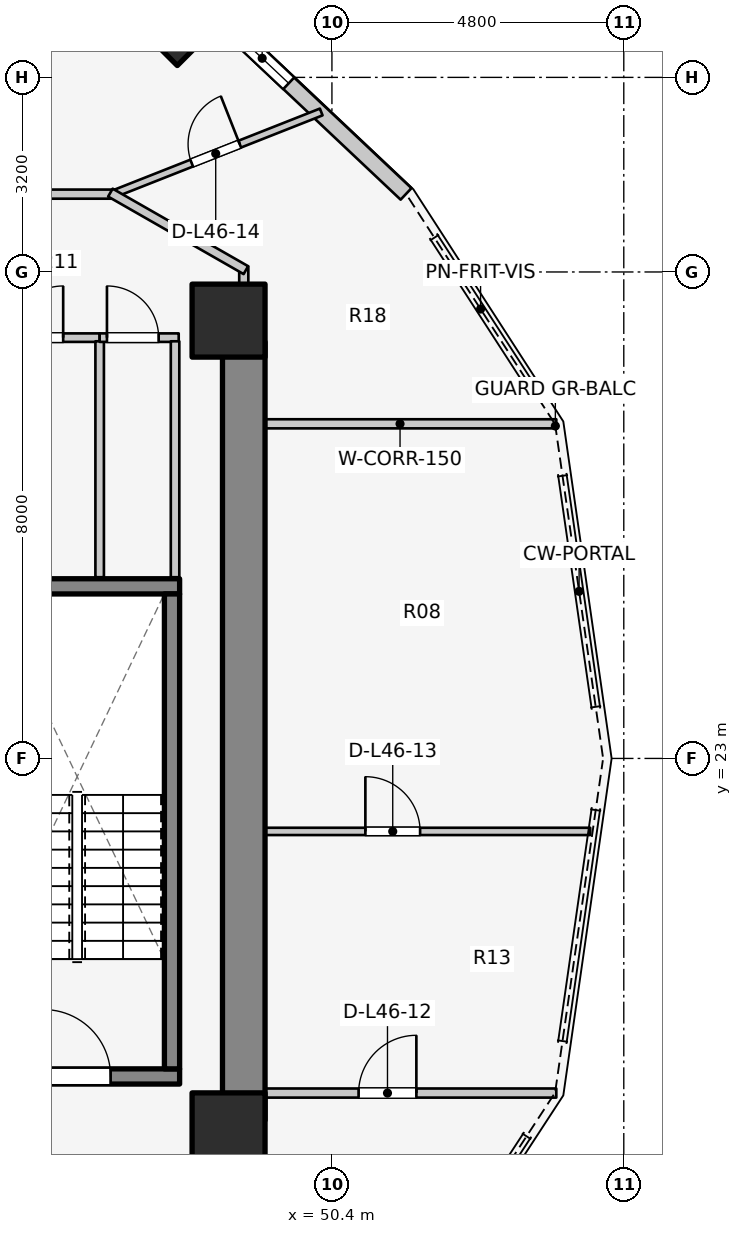
"""IFC4 building model, lengths in metres.
Left out: names, types, materials, properties, quantities, classifications, styles, units other than length and angle.
Written with IfcOpenShell. Run it as: python <this file> out.ifc"""

import sys

from ifc_helpers import new_model, si_unit, direction, frame, frame_2d, origin, origin_2d, place, context, subcontext, project, spatial, rectangle, extrude, element, fill, save


model = new_model("IFC4")
c1 = context("Model", 3, precision=1e-05, world=origin(), true_north=direction((0.0, 1.0)))
c2 = subcontext(c1, "Body", "Model", "MODEL_VIEW")
j1 = project(units=[si_unit("LENGTHUNIT", "METRE"), si_unit("PLANEANGLEUNIT", "RADIAN")], contexts=[c1])
p1 = place(None, origin())
s1 = spatial("IfcSite", under=j1, at=p1, CompositionType="ELEMENT")
p2 = place(p1, origin())
s2 = spatial("IfcBuilding", under=s1, at=p2, CompositionType="ELEMENT")
p3 = place(p2, frame((0.0, 0.0, 152.9)))
s3 = spatial("IfcBuildingStorey", under=s2, at=p3, CompositionType="ELEMENT", Elevation=152.9)
p4 = place(p3, frame((48.95, 17.05, 0.0), z_axis=(0.0, 0.0, 1.0), x_axis=(0.0, 1.0, 0.0)))
e1 = element("IfcWall", 1, at=p4, inside=s3, PredefinedType="SHEAR", context=c2, shape_type="SweptSolid", body=[
    extrude(rectangle(XDim=12.8, YDim=0.7, at=frame_2d((6.4, 0.0))), origin(), (0.0, 0.0, 1.0), 3.1),
])
p5 = place(p3, frame((44.525, 17.77, 0.0), z_axis=(0.0, 0.0, 1.0), x_axis=(1.0, 0.0, 0.0)))
e2 = element("IfcWall", 2, at=p5, inside=s3, PredefinedType="SOLIDWALL", context=c2, shape_type="SweptSolid", body=[
    extrude(rectangle(XDim=3.37, YDim=0.25, at=frame_2d((1.685, 0.0))), origin(), (0.0, 0.0, 1.0), 3.1),
])
p6 = place(p5, frame((1.135, 0.0, 0.0)))
e3 = element("IfcOpeningElement", 3, at=p6, cuts=e2, PredefinedType="OPENING", context=c2, shape_type="SweptSolid", body=[
    extrude(rectangle(XDim=1.1, YDim=2.1, at=frame_2d((0.55, 1.05))), frame((0.0, 0.135, 0.0), z_axis=(0.0, -1.0, 0.0), x_axis=(1.0, 0.0, 0.0)), (0.0, 0.0, 1.0), 0.27),
])
p7 = place(p3, frame((44.525, 25.83, 0.0), z_axis=(0.0, 0.0, 1.0), x_axis=(1.0, 0.0, 0.0)))
e4 = element("IfcWall", 4, at=p7, inside=s3, PredefinedType="SOLIDWALL", context=c2, shape_type="SweptSolid", body=[
    extrude(rectangle(XDim=3.37, YDim=0.25, at=frame_2d((1.685, 0.0))), origin(), (0.0, 0.0, 1.0), 3.1),
])
p8 = place(p3, frame((47.77, 17.895, 0.0), z_axis=(0.0, 0.0, 1.0), x_axis=(0.0, 1.0, 0.0)))
e5 = element("IfcWall", 5, at=p8, inside=s3, PredefinedType="SOLIDWALL", context=c2, shape_type="SweptSolid", body=[
    extrude(rectangle(XDim=7.81, YDim=0.25, at=frame_2d((3.905, 0.0))), origin(), (0.0, 0.0, 1.0), 3.1),
])
for number, where, z_axis, x_axis in (
    (6, (48.7, 16.9, 0.0), (0.0, 0.0, 1.0), (1.0, 0.0, 0.0)),
    (7, (48.7, 30.2, 0.0), (0.0, 0.0, 1.0), (1.0, 0.0, 0.0)),
):
    element("IfcColumn", number, at=place(p3, frame(where, z_axis=z_axis, x_axis=x_axis)), inside=s3, PredefinedType="COLUMN", context=c2, shape_type="SweptSolid", body=[
        extrude(rectangle(XDim=1.2, YDim=1.2, at=origin_2d()), origin(), (0.0, 0.0, 1.0), 3.1),
    ])
p9 = place(p3, frame((47.857, 35.031, 0.0), z_axis=(0.0, 0.0, 1.0), x_axis=(0.707106781187, 0.707106781187, 0.0)))
e8 = element("IfcColumn", 8, at=p9, inside=s3, PredefinedType="COLUMN", context=c2, shape_type="SweptSolid", body=[
    extrude(rectangle(XDim=0.9, YDim=0.9, at=origin_2d()), origin(), (0.0, 0.0, 1.0), 3.1),
])
p10 = place(p3, frame((51.619, 32.284, 0.0), z_axis=(0.0, 0.0, 1.0), x_axis=(-0.727667301037, 0.68593024354, 0.0)))
e9 = element("IfcWall", 9, at=p10, inside=s3, PredefinedType="STANDARD", context=c2, shape_type="SweptSolid", body=[
    extrude(rectangle(XDim=4.604, YDim=0.26, at=frame_2d((2.302, 0.0))), origin(), (0.0, 0.0, 1.0), 2.85),
])
p11 = place(p10, frame((2.652, 0.0, 0.75)))
e10 = element("IfcOpeningElement", 10, at=p11, cuts=e9, PredefinedType="OPENING", context=c2, shape_type="SweptSolid", body=[
    extrude(rectangle(XDim=1.2, YDim=1.5, at=frame_2d((0.6, 0.75))), frame((0.0, 0.14, 0.0), z_axis=(0.0, -1.0, 0.0), x_axis=(1.0, 0.0, 0.0)), (0.0, 0.0, 1.0), 0.28),
])
p12 = place(p3, frame((44.58, 29.92, 0.0), z_axis=(0.0, 0.0, 1.0), x_axis=(1.0, 0.0, 0.0)))
e11 = element("IfcWall", 11, at=p12, inside=s3, PredefinedType="PLUMBINGWALL", context=c2, shape_type="SweptSolid", body=[
    extrude(rectangle(XDim=2.0, YDim=0.14, at=frame_2d((1.0, 0.0))), origin(), (0.0, 0.0, 1.0), 2.855),
])
p13 = place(p12, frame((0.55, 0.0, 0.0)))
e12 = element("IfcOpeningElement", 12, at=p13, cuts=e11, PredefinedType="OPENING", context=c2, shape_type="SweptSolid", body=[
    extrude(rectangle(XDim=0.85, YDim=2.05, at=frame_2d((0.425, 1.025))), frame((0.0, 0.08, 0.0), z_axis=(0.0, -1.0, 0.0), x_axis=(1.0, 0.0, 0.0)), (0.0, 0.0, 1.0), 0.16),
])
p14 = place(p3, frame((46.58, 25.98, 0.0), z_axis=(0.0, 0.0, 1.0), x_axis=(0.0, 1.0, 0.0)))
e13 = element("IfcWall", 13, at=p14, inside=s3, PredefinedType="PLUMBINGWALL", context=c2, shape_type="SweptSolid", body=[
    extrude(rectangle(XDim=3.88, YDim=0.14, at=frame_2d((1.94, 0.0))), origin(), (0.0, 0.0, 1.0), 2.855),
])
p15 = place(p3, frame((46.58, 29.92, 0.0), z_axis=(0.0, 0.0, 1.0), x_axis=(1.0, 0.0, 0.0)))
e14 = element("IfcWall", 14, at=p15, inside=s3, PredefinedType="PLUMBINGWALL", context=c2, shape_type="SweptSolid", body=[
    extrude(rectangle(XDim=1.3, YDim=0.14, at=frame_2d((0.65, 0.0))), origin(), (0.0, 0.0, 1.0), 2.855),
])
p16 = place(p15, frame((0.12, 0.0, 0.0)))
e15 = element("IfcOpeningElement", 15, at=p16, cuts=e14, PredefinedType="OPENING", context=c2, shape_type="SweptSolid", body=[
    extrude(rectangle(XDim=0.85, YDim=2.05, at=frame_2d((0.425, 1.025))), frame((0.0, 0.08, 0.0), z_axis=(0.0, -1.0, 0.0), x_axis=(1.0, 0.0, 0.0)), (0.0, 0.0, 1.0), 0.16),
])
p17 = place(p3, frame((47.82, 25.98, 0.0), z_axis=(0.0, 0.0, 1.0), x_axis=(0.0, 1.0, 0.0)))
e16 = element("IfcWall", 16, at=p17, inside=s3, PredefinedType="PLUMBINGWALL", context=c2, shape_type="SweptSolid", body=[
    extrude(rectangle(XDim=3.88, YDim=0.14, at=frame_2d((1.94, 0.0))), origin(), (0.0, 0.0, 1.0), 2.855),
])
p18 = place(p3, frame((48.95, 17.497, 0.0), z_axis=(0.0, 0.0, 1.0), x_axis=(1.0, 0.0, 0.0)))
e17 = element("IfcWall", 17, at=p18, inside=s3, PredefinedType="PARTITIONING", context=c2, shape_type="SweptSolid", body=[
    extrude(rectangle(XDim=5.14, YDim=0.15, at=frame_2d((2.57, 0.0))), origin(), (0.0, 0.0, 1.0), 2.855),
])
p19 = place(p18, frame((1.889, 0.0, 0.0)))
e18 = element("IfcOpeningElement", 18, at=p19, cuts=e17, PredefinedType="OPENING", context=c2, shape_type="SweptSolid", body=[
    extrude(rectangle(XDim=0.95, YDim=2.1, at=frame_2d((0.475, 1.05))), frame((0.0, 0.085, 0.0), z_axis=(0.0, -1.0, 0.0), x_axis=(1.0, 0.0, 0.0)), (0.0, 0.0, 1.0), 0.17),
])
p20 = place(p3, frame((48.95, 28.503, 0.0), z_axis=(0.0, 0.0, 1.0), x_axis=(1.0, 0.0, 0.0)))
e19 = element("IfcWall", 19, at=p20, inside=s3, PredefinedType="PARTITIONING", context=c2, shape_type="SweptSolid", body=[
    extrude(rectangle(XDim=5.14, YDim=0.15, at=frame_2d((2.57, 0.0))), origin(), (0.0, 0.0, 1.0), 2.855),
])
p21 = place(p3, frame((48.95, 21.8, 0.0), z_axis=(0.0, 0.0, 1.0), x_axis=(1.0, 0.0, 0.0)))
e20 = element("IfcWall", 20, at=p21, inside=s3, PredefinedType="MOVABLE", context=c2, shape_type="SweptSolid", body=[
    extrude(rectangle(XDim=5.698, YDim=0.12, at=frame_2d((2.849, 0.0))), origin(), (0.0, 0.0, 1.0), 2.855),
])
p22 = place(p21, frame((2.0, 0.0, 0.0)))
e21 = element("IfcOpeningElement", 21, at=p22, cuts=e20, PredefinedType="OPENING", context=c2, shape_type="SweptSolid", body=[
    extrude(rectangle(XDim=0.9, YDim=2.1, at=frame_2d((0.45, 1.05))), frame((0.0, 0.07, 0.0), z_axis=(0.0, -1.0, 0.0), x_axis=(1.0, 0.0, 0.0)), (0.0, 0.0, 1.0), 0.14),
])
p23 = place(p3, frame((48.95, 29.8, 0.0), z_axis=(0.0, 0.0, 1.0), x_axis=(0.0, 1.0, 0.0)))
e22 = element("IfcWall", 22, at=p23, inside=s3, PredefinedType="PARTITIONING", context=c2, shape_type="SweptSolid", body=[
    extrude(rectangle(XDim=1.29, YDim=0.15, at=frame_2d((0.645, 0.0))), origin(), (0.0, 0.0, 1.0), 2.855),
])
p24 = place(p3, frame((46.753, 32.262, 0.0), z_axis=(0.0, 0.0, 1.0), x_axis=(0.930204027108, 0.367042869367, 0.0)))
e23 = element("IfcWall", 23, at=p24, inside=s3, PredefinedType="MOVABLE", context=c2, shape_type="SweptSolid", body=[
    extrude(rectangle(XDim=3.731, YDim=0.12, at=frame_2d((1.865, 0.0))), origin(), (0.0, 0.0, 1.0), 2.22),
])
p25 = place(p24, frame((1.44, 0.0, 0.0)))
e24 = element("IfcOpeningElement", 24, at=p25, cuts=e23, PredefinedType="OPENING", context=c2, shape_type="SweptSolid", body=[
    extrude(rectangle(XDim=0.85, YDim=2.05, at=frame_2d((0.425, 1.025))), frame((0.0, 0.07, 0.0), z_axis=(0.0, -1.0, 0.0), x_axis=(1.0, 0.0, 0.0)), (0.0, 0.0, 1.0), 0.14),
])
p26 = place(p3, frame((39.33, 32.28, 0.0), z_axis=(0.0, 0.0, 1.0), x_axis=(1.0, 0.0, 0.0)))
e25 = element("IfcWall", 25, at=p26, inside=s3, PredefinedType="PARTITIONING", context=c2, shape_type="SweptSolid", body=[
    extrude(rectangle(XDim=7.52, YDim=0.15, at=frame_2d((3.76, 0.0))), origin(), (0.0, 0.0, 1.0), 2.299),
])
p27 = place(p26, frame((5.22, 0.0, 0.0)))
e26 = element("IfcOpeningElement", 26, at=p27, cuts=e25, PredefinedType="OPENING", context=c2, shape_type="SweptSolid", body=[
    extrude(rectangle(XDim=0.9, YDim=2.1, at=frame_2d((0.45, 1.05))), frame((0.0, 0.085, 0.0), z_axis=(0.0, -1.0, 0.0), x_axis=(1.0, 0.0, 0.0)), (0.0, 0.0, 1.0), 0.17),
])
p28 = place(p3, frame((46.757, 32.305, 0.0), z_axis=(0.0, 0.0, 1.0), x_axis=(0.867991349648, -0.496579315857, 0.0)))
e27 = element("IfcWall", 27, at=p28, inside=s3, PredefinedType="PARTITIONING", context=c2, shape_type="SweptSolid", body=[
    extrude(rectangle(XDim=2.567, YDim=0.15, at=frame_2d((1.283, 0.0))), origin(), (0.0, 0.0, 1.0), 2.22),
])
p29 = place(p11, origin())
e28 = element("IfcWindow", 28, at=p29, inside=s3, PartitioningType="SINGLE_PANEL", PredefinedType="WINDOW", context=c2, shape_type="SweptSolid", body=[
    extrude(rectangle(XDim=1.2, YDim=1.5, at=frame_2d((0.6, 0.75))), frame((0.0, 0.03, 0.0), z_axis=(0.0, -1.0, 0.0), x_axis=(1.0, 0.0, 0.0)), (0.0, 0.0, 1.0), 0.06),
])
fill(e10, e28)
p30 = place(p6, origin())
e29 = element("IfcDoor", 29, at=p30, inside=s3, OperationType="SINGLE_SWING_LEFT", PredefinedType="DOOR", context=c2, shape_type="SweptSolid", body=[
    extrude(rectangle(XDim=1.1, YDim=2.1, at=frame_2d((0.55, 1.05))), frame((0.0, 0.025, 0.0), z_axis=(0.0, -1.0, 0.0), x_axis=(1.0, 0.0, 0.0)), (0.0, 0.0, 1.0), 0.05),
])
fill(e3, e29)
p31 = place(p13, origin())
e30 = element("IfcDoor", 30, at=p31, inside=s3, OperationType="SINGLE_SWING_RIGHT", PredefinedType="DOOR", context=c2, shape_type="SweptSolid", body=[
    extrude(rectangle(XDim=0.85, YDim=2.05, at=frame_2d((0.425, 1.025))), frame((0.0, 0.025, 0.0), z_axis=(0.0, -1.0, 0.0), x_axis=(1.0, 0.0, 0.0)), (0.0, 0.0, 1.0), 0.05),
])
fill(e12, e30)
p32 = place(p16, origin())
e31 = element("IfcDoor", 31, at=p32, inside=s3, OperationType="SINGLE_SWING_LEFT", PredefinedType="DOOR", context=c2, shape_type="SweptSolid", body=[
    extrude(rectangle(XDim=0.85, YDim=2.05, at=frame_2d((0.425, 1.025))), frame((0.0, 0.025, 0.0), z_axis=(0.0, -1.0, 0.0), x_axis=(1.0, 0.0, 0.0)), (0.0, 0.0, 1.0), 0.05),
])
fill(e15, e31)
p33 = place(p19, origin())
e32 = element("IfcDoor", 32, at=p33, inside=s3, OperationType="SINGLE_SWING_RIGHT", PredefinedType="DOOR", context=c2, shape_type="SweptSolid", body=[
    extrude(rectangle(XDim=0.95, YDim=2.1, at=frame_2d((0.475, 1.05))), frame((0.0, 0.025, 0.0), z_axis=(0.0, -1.0, 0.0), x_axis=(1.0, 0.0, 0.0)), (0.0, 0.0, 1.0), 0.05),
])
fill(e18, e32)
p34 = place(p22, origin())
e33 = element("IfcDoor", 33, at=p34, inside=s3, OperationType="SINGLE_SWING_LEFT", PredefinedType="DOOR", context=c2, shape_type="SweptSolid", body=[
    extrude(rectangle(XDim=0.9, YDim=2.1, at=frame_2d((0.45, 1.05))), frame((0.0, 0.025, 0.0), z_axis=(0.0, -1.0, 0.0), x_axis=(1.0, 0.0, 0.0)), (0.0, 0.0, 1.0), 0.05),
])
fill(e21, e33)
p35 = place(p25, origin())
e34 = element("IfcDoor", 34, at=p35, inside=s3, OperationType="SINGLE_SWING_RIGHT", PredefinedType="DOOR", context=c2, shape_type="SweptSolid", body=[
    extrude(rectangle(XDim=0.85, YDim=2.05, at=frame_2d((0.425, 1.025))), frame((0.0, 0.025, 0.0), z_axis=(0.0, -1.0, 0.0), x_axis=(1.0, 0.0, 0.0)), (0.0, 0.0, 1.0), 0.05),
])
fill(e24, e34)
save(model, sys.argv[1])
